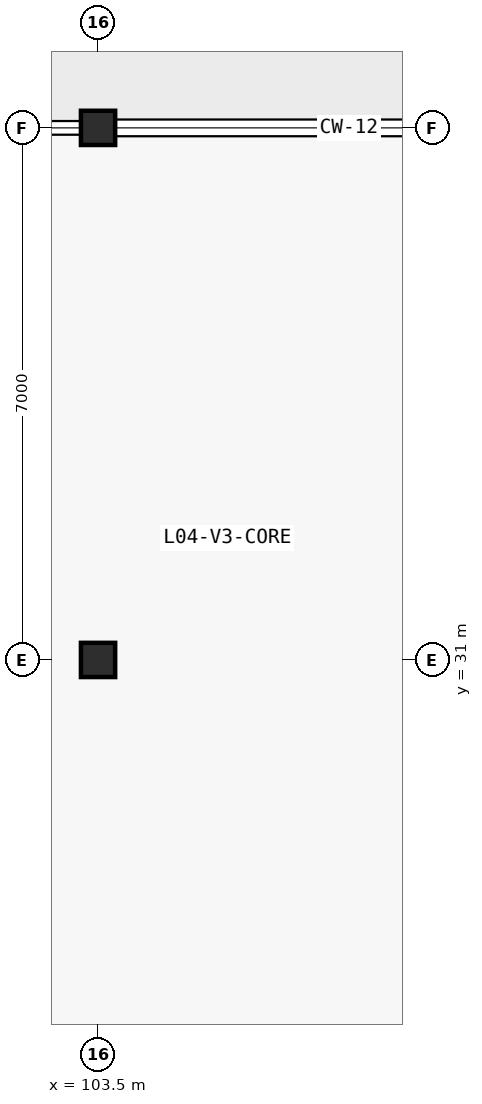
"""IFC4 building model, lengths in metres.
Left out: names, types, materials, properties, quantities, classifications, styles, units other than length and angle.
Written with IfcOpenShell. Run it as: python <this file> out.ifc"""

import sys

from ifc_helpers import new_model, si_unit, direction, frame, origin, origin_2d, place, context, subcontext, project, spatial, rectangle, extrude, element, save


model = new_model("IFC4")
c1 = context("Model", 3, precision=1e-05, world=origin(), true_north=direction((0.0, 1.0)))
c2 = subcontext(c1, "Body", "Model", "MODEL_VIEW")
j1 = project(units=[si_unit("LENGTHUNIT", "METRE"), si_unit("PLANEANGLEUNIT", "RADIAN")], contexts=[c1])
p1 = place(None, origin())
s1 = spatial("IfcSite", under=j1, at=p1, CompositionType="ELEMENT")
p2 = place(p1, origin())
s2 = spatial("IfcBuilding", under=s1, at=p2, CompositionType="ELEMENT")
p3 = place(p2, frame((0.0, 0.0, 16.8)))
s3 = spatial("IfcBuildingStorey", under=s2, at=p3, CompositionType="ELEMENT", Elevation=16.8)
for number, where, z_axis, x_axis in (
    (1, (103.5, 31.0, 0.0), (0.0, 0.0, 1.0), (1.0, 0.0, 0.0)),
    (2, (103.5, 38.0, 0.0), (0.0, 0.0, 1.0), (1.0, 0.0, 0.0)),
):
    element("IfcColumn", number, at=place(p3, frame(where, z_axis=z_axis, x_axis=x_axis)), inside=s3, PredefinedType="COLUMN", context=c2, shape_type="SweptSolid", body=[
        extrude(rectangle(XDim=0.45, YDim=0.45, at=origin_2d()), origin(), (0.0, 0.0, 1.0), 4.2),
    ])
save(model, sys.argv[1])
